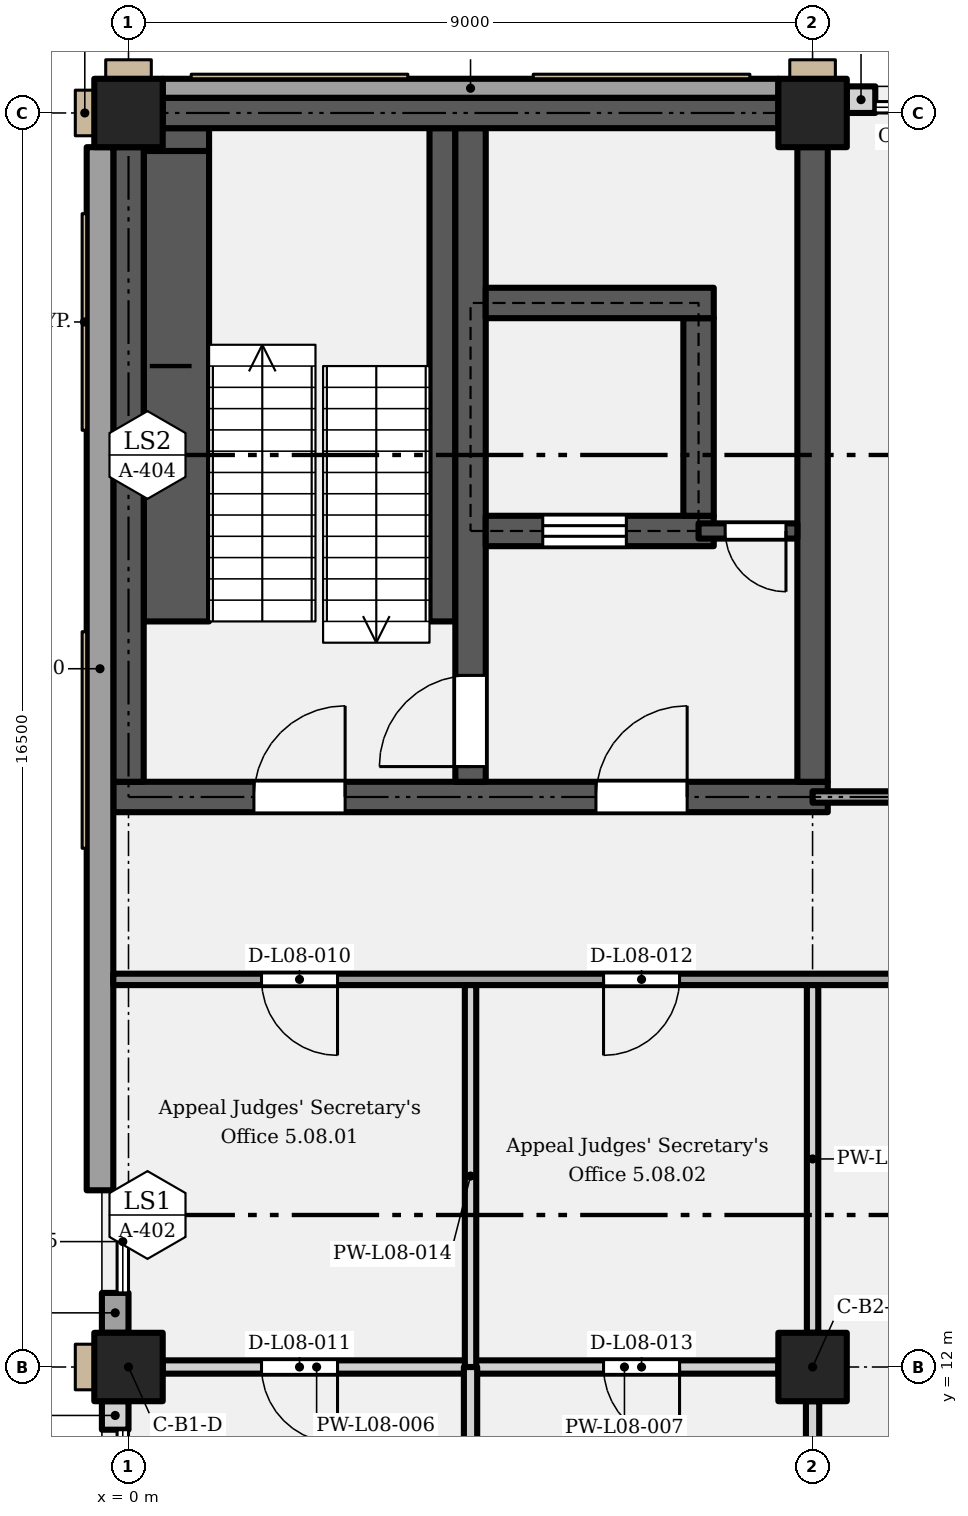
"""IFC4 building model, lengths in metres.
Left out: names, types, materials, properties, quantities, classifications, styles, units other than length and angle.
Written with IfcOpenShell. Run it as: python <this file> out.ifc"""

import sys

from ifc_helpers import new_model, si_unit, direction, frame, frame_2d, origin, origin_2d, place, context, subcontext, project, spatial, rectangle, extrude, element, fill, save


model = new_model("IFC4")
c1 = context("Model", 3, precision=1e-05, world=origin(), true_north=direction((0.0, 1.0)))
c2 = subcontext(c1, "Body", "Model", "MODEL_VIEW")
j1 = project(units=[si_unit("LENGTHUNIT", "METRE"), si_unit("PLANEANGLEUNIT", "RADIAN")], contexts=[c1])
p1 = place(None, origin())
s1 = spatial("IfcSite", under=j1, at=p1, CompositionType="ELEMENT")
p2 = place(p1, origin())
s2 = spatial("IfcBuilding", under=s1, at=p2, CompositionType="ELEMENT")
p3 = place(p2, frame((0.0, 0.0, 44.4)))
s3 = spatial("IfcBuildingStorey", under=s2, at=p3, CompositionType="ELEMENT", Elevation=44.4)
for number, where, z_axis, x_axis in (
    (1, (0.0, 12.0, 0.0), (0.0, 0.0, 1.0), (1.0, 0.0, 0.0)),
    (2, (9.0, 12.0, 0.0), (0.0, 0.0, 1.0), (1.0, 0.0, 0.0)),
    (3, (0.0, 28.5, 0.0), (0.0, 0.0, 1.0), (1.0, 0.0, 0.0)),
    (4, (9.0, 28.5, 0.0), (0.0, 0.0, 1.0), (1.0, 0.0, 0.0)),
):
    element("IfcColumn", number, at=place(p3, frame(where, z_axis=z_axis, x_axis=x_axis)), inside=s3, PredefinedType="COLUMN", context=c2, shape_type="SweptSolid", body=[
        extrude(rectangle(XDim=0.9, YDim=0.9, at=origin_2d()), origin(), (0.0, 0.0, 1.0), 4.5),
    ])
p4 = place(p3, frame((-0.2, 19.5, 0.0), z_axis=(0.0, 0.0, 1.0), x_axis=(1.0, 0.0, 0.0)))
e5 = element("IfcWall", 5, at=p4, inside=s3, PredefinedType="SHEAR", context=c2, shape_type="SweptSolid", body=[
    extrude(rectangle(XDim=9.4, YDim=0.4, at=frame_2d((4.7, 0.0))), origin(), (0.0, 0.0, 1.0), 4.25),
])
p5 = place(p4, frame((1.85, 0.0, 0.0)))
e6 = element("IfcOpeningElement", 6, at=p5, cuts=e5, PredefinedType="OPENING", context=c2, shape_type="SweptSolid", body=[
    extrude(rectangle(XDim=1.2, YDim=2.1, at=frame_2d((0.6, 1.05))), frame((0.0, 0.21, 0.0), z_axis=(0.0, -1.0, 0.0), x_axis=(1.0, 0.0, 0.0)), (0.0, 0.0, 1.0), 0.42),
])
p6 = place(p4, frame((6.35, 0.0, 0.0)))
e7 = element("IfcOpeningElement", 7, at=p6, cuts=e5, PredefinedType="OPENING", context=c2, shape_type="SweptSolid", body=[
    extrude(rectangle(XDim=1.2, YDim=2.1, at=frame_2d((0.6, 1.05))), frame((0.0, 0.21, 0.0), z_axis=(0.0, -1.0, 0.0), x_axis=(1.0, 0.0, 0.0)), (0.0, 0.0, 1.0), 0.42),
])
p7 = place(p3, frame((0.0, 19.7, 0.0), z_axis=(0.0, 0.0, 1.0), x_axis=(0.0, 1.0, 0.0)))
e8 = element("IfcWall", 8, at=p7, inside=s3, PredefinedType="SHEAR", context=c2, shape_type="SweptSolid", body=[
    extrude(rectangle(XDim=8.35, YDim=0.4, at=frame_2d((4.175, 0.0))), origin(), (0.0, 0.0, 1.0), 4.25),
])
p8 = place(p3, frame((4.5, 19.7, 0.0), z_axis=(0.0, 0.0, 1.0), x_axis=(0.0, 1.0, 0.0)))
e9 = element("IfcWall", 9, at=p8, inside=s3, PredefinedType="SHEAR", context=c2, shape_type="SweptSolid", body=[
    extrude(rectangle(XDim=8.6, YDim=0.4, at=frame_2d((4.3, 0.0))), origin(), (0.0, 0.0, 1.0), 4.25),
])
p9 = place(p8, frame((0.2, 0.0, 0.0)))
e10 = element("IfcOpeningElement", 10, at=p9, cuts=e9, PredefinedType="OPENING", context=c2, shape_type="SweptSolid", body=[
    extrude(rectangle(XDim=1.2, YDim=2.1, at=frame_2d((0.6, 1.05))), frame((0.0, 0.21, 0.0), z_axis=(0.0, -1.0, 0.0), x_axis=(1.0, 0.0, 0.0)), (0.0, 0.0, 1.0), 0.42),
])
p10 = place(p3, frame((9.0, 19.7, 0.0), z_axis=(0.0, 0.0, 1.0), x_axis=(0.0, 1.0, 0.0)))
e11 = element("IfcWall", 11, at=p10, inside=s3, PredefinedType="SHEAR", context=c2, shape_type="SweptSolid", body=[
    extrude(rectangle(XDim=8.35, YDim=0.4, at=frame_2d((4.175, 0.0))), origin(), (0.0, 0.0, 1.0), 4.25),
])
p11 = place(p3, frame((4.7, 23.0, 0.0), z_axis=(0.0, 0.0, 1.0), x_axis=(1.0, 0.0, 0.0)))
e12 = element("IfcWall", 12, at=p11, inside=s3, PredefinedType="SHEAR", context=c2, shape_type="SweptSolid", body=[
    extrude(rectangle(XDim=3.0, YDim=0.4, at=frame_2d((1.5, 0.0))), origin(), (0.0, 0.0, 1.0), 4.25),
])
p12 = place(p11, frame((0.75, 0.0, 0.0)))
e13 = element("IfcOpeningElement", 13, at=p12, cuts=e12, PredefinedType="OPENING", context=c2, shape_type="SweptSolid", body=[
    extrude(rectangle(XDim=1.1, YDim=2.1, at=frame_2d((0.55, 1.05))), frame((0.0, 0.21, 0.0), z_axis=(0.0, -1.0, 0.0), x_axis=(1.0, 0.0, 0.0)), (0.0, 0.0, 1.0), 0.42),
])
p13 = place(p3, frame((7.5, 23.2, 0.0), z_axis=(0.0, 0.0, 1.0), x_axis=(0.0, 1.0, 0.0)))
e14 = element("IfcWall", 14, at=p13, inside=s3, PredefinedType="SHEAR", context=c2, shape_type="SweptSolid", body=[
    extrude(rectangle(XDim=2.6, YDim=0.4, at=frame_2d((1.3, 0.0))), origin(), (0.0, 0.0, 1.0), 4.25),
])
p14 = place(p3, frame((4.7, 26.0, 0.0), z_axis=(0.0, 0.0, 1.0), x_axis=(1.0, 0.0, 0.0)))
e15 = element("IfcWall", 15, at=p14, inside=s3, PredefinedType="SHEAR", context=c2, shape_type="SweptSolid", body=[
    extrude(rectangle(XDim=3.0, YDim=0.4, at=frame_2d((1.5, 0.0))), origin(), (0.0, 0.0, 1.0), 4.25),
])
p15 = place(p3, frame((0.45, 28.5, 0.0), z_axis=(0.0, 0.0, 1.0), x_axis=(1.0, 0.0, 0.0)))
e16 = element("IfcWall", 16, at=p15, inside=s3, PredefinedType="SHEAR", context=c2, shape_type="SweptSolid", body=[
    extrude(rectangle(XDim=8.1, YDim=0.4, at=frame_2d((4.05, 0.0))), origin(), (0.0, 0.0, 1.0), 4.25),
])
p16 = place(p3, frame((0.45, 28.825, 0.0), z_axis=(0.0, 0.0, 1.0), x_axis=(1.0, 0.0, 0.0)))
e17 = element("IfcWall", 17, at=p16, inside=s3, PredefinedType="SOLIDWALL", context=c2, shape_type="SweptSolid", body=[
    extrude(rectangle(XDim=8.1, YDim=0.25, at=frame_2d((4.05, 0.0))), origin(), (0.0, 0.0, 1.0), 4.25),
])
for number, where, z_axis, x_axis in (
    (18, (9.45, 28.675, 0.0), (0.0, 0.0, 1.0), (1.0, 0.0, 0.0)),
    (19, (-0.175, 11.175, 0.0), (0.0, 0.0, 1.0), (0.0, 1.0, 0.0)),
):
    element("IfcWall", number, at=place(p3, frame(where, z_axis=z_axis, x_axis=x_axis)), inside=s3, PredefinedType="SOLIDWALL", context=c2, shape_type="SweptSolid", body=[
        extrude(rectangle(XDim=0.375, YDim=0.35, at=frame_2d((0.188, 0.0))), origin(), (0.0, 0.0, 1.0), 4.25),
    ])
p17 = place(p3, frame((-0.175, 12.45, 0.0), z_axis=(0.0, 0.0, 1.0), x_axis=(0.0, 1.0, 0.0)))
e20 = element("IfcWall", 20, at=p17, inside=s3, PredefinedType="SOLIDWALL", context=c2, shape_type="SweptSolid", body=[
    extrude(rectangle(XDim=0.525, YDim=0.35, at=frame_2d((0.263, 0.0))), origin(), (0.0, 0.0, 1.0), 4.25),
])
p18 = place(p3, frame((-0.375, 14.325, 0.0), z_axis=(0.0, 0.0, 1.0), x_axis=(0.0, 1.0, 0.0)))
e21 = element("IfcWall", 21, at=p18, inside=s3, PredefinedType="SOLIDWALL", context=c2, shape_type="SweptSolid", body=[
    extrude(rectangle(XDim=13.725, YDim=0.35, at=frame_2d((6.863, 0.0))), origin(), (0.0, 0.0, 1.0), 4.25),
])
p19 = place(p3, frame((0.45, 12.0, 0.0), z_axis=(0.0, 0.0, 1.0), x_axis=(1.0, 0.0, 0.0)))
e22 = element("IfcWall", 22, at=p19, inside=s3, PredefinedType="PARTITIONING", context=c2, shape_type="SweptSolid", body=[
    extrude(rectangle(XDim=4.05, YDim=0.175, at=frame_2d((2.025, 0.0))), origin(), (0.0, 0.0, 1.0), 3.5),
])
p20 = place(p19, frame((2.3, 0.0, 0.0), z_axis=(0.0, 0.0, 1.0), x_axis=(-1.0, 0.0, 0.0)))
e23 = element("IfcOpeningElement", 23, at=p20, cuts=e22, PredefinedType="OPENING", context=c2, shape_type="SweptSolid", body=[
    extrude(rectangle(XDim=1.0, YDim=2.1, at=frame_2d((0.5, 1.05))), frame((0.0, 0.097, 0.0), z_axis=(0.0, -1.0, 0.0), x_axis=(1.0, 0.0, 0.0)), (0.0, 0.0, 1.0), 0.195),
])
p21 = place(p3, frame((4.5, 12.0, 0.0), z_axis=(0.0, 0.0, 1.0), x_axis=(1.0, 0.0, 0.0)))
e24 = element("IfcWall", 24, at=p21, inside=s3, PredefinedType="PARTITIONING", context=c2, shape_type="SweptSolid", body=[
    extrude(rectangle(XDim=4.05, YDim=0.175, at=frame_2d((2.025, 0.0))), origin(), (0.0, 0.0, 1.0), 3.5),
])
p22 = place(p21, frame((2.75, 0.0, 0.0), z_axis=(0.0, 0.0, 1.0), x_axis=(-1.0, 0.0, 0.0)))
e25 = element("IfcOpeningElement", 25, at=p22, cuts=e24, PredefinedType="OPENING", context=c2, shape_type="SweptSolid", body=[
    extrude(rectangle(XDim=1.0, YDim=2.1, at=frame_2d((0.5, 1.05))), frame((0.0, 0.097, 0.0), z_axis=(0.0, -1.0, 0.0), x_axis=(1.0, 0.0, 0.0)), (0.0, 0.0, 1.0), 0.195),
])
p23 = place(p3, frame((-0.2, 17.1, 0.0), z_axis=(0.0, 0.0, 1.0), x_axis=(1.0, 0.0, 0.0)))
e26 = element("IfcWall", 26, at=p23, inside=s3, PredefinedType="PARTITIONING", context=c2, shape_type="SweptSolid", body=[
    extrude(rectangle(XDim=25.0, YDim=0.15, at=frame_2d((12.5, 0.0))), origin(), (0.0, 0.0, 1.0), 4.25),
])
p24 = place(p23, frame((2.95, 0.0, 0.0), z_axis=(0.0, 0.0, 1.0), x_axis=(-1.0, 0.0, 0.0)))
e27 = element("IfcOpeningElement", 27, at=p24, cuts=e26, PredefinedType="OPENING", context=c2, shape_type="SweptSolid", body=[
    extrude(rectangle(XDim=1.0, YDim=2.1, at=frame_2d((0.5, 1.05))), frame((0.0, 0.085, 0.0), z_axis=(0.0, -1.0, 0.0), x_axis=(1.0, 0.0, 0.0)), (0.0, 0.0, 1.0), 0.17),
])
p25 = place(p23, frame((7.45, 0.0, 0.0), z_axis=(0.0, 0.0, 1.0), x_axis=(-1.0, 0.0, 0.0)))
e28 = element("IfcOpeningElement", 28, at=p25, cuts=e26, PredefinedType="OPENING", context=c2, shape_type="SweptSolid", body=[
    extrude(rectangle(XDim=1.0, YDim=2.1, at=frame_2d((0.5, 1.05))), frame((0.0, 0.085, 0.0), z_axis=(0.0, -1.0, 0.0), x_axis=(1.0, 0.0, 0.0)), (0.0, 0.0, 1.0), 0.17),
])
p26 = place(p23, frame((14.2, 0.0, 0.0), z_axis=(0.0, 0.0, 1.0), x_axis=(-1.0, 0.0, 0.0)))
e29 = element("IfcOpeningElement", 29, at=p26, cuts=e26, PredefinedType="OPENING", context=c2, shape_type="SweptSolid", body=[
    extrude(rectangle(XDim=1.0, YDim=2.1, at=frame_2d((0.5, 1.05))), frame((0.0, 0.085, 0.0), z_axis=(0.0, -1.0, 0.0), x_axis=(1.0, 0.0, 0.0)), (0.0, 0.0, 1.0), 0.17),
])
p27 = place(p23, frame((20.95, 0.0, 0.0), z_axis=(0.0, 0.0, 1.0), x_axis=(-1.0, 0.0, 0.0)))
e30 = element("IfcOpeningElement", 30, at=p27, cuts=e26, PredefinedType="OPENING", context=c2, shape_type="SweptSolid", body=[
    extrude(rectangle(XDim=1.0, YDim=2.1, at=frame_2d((0.5, 1.05))), frame((0.0, 0.085, 0.0), z_axis=(0.0, -1.0, 0.0), x_axis=(1.0, 0.0, 0.0)), (0.0, 0.0, 1.0), 0.17),
])
p28 = place(p3, frame((9.0, 19.5, 0.0), z_axis=(0.0, 0.0, 1.0), x_axis=(1.0, 0.0, 0.0)))
e31 = element("IfcWall", 31, at=p28, inside=s3, PredefinedType="PARTITIONING", context=c2, shape_type="SweptSolid", body=[
    extrude(rectangle(XDim=9.0, YDim=0.15, at=frame_2d((4.5, 0.0))), origin(), (0.0, 0.0, 1.0), 4.25),
])
p29 = place(p28, frame((3.6, 0.0, 0.0)))
e32 = element("IfcOpeningElement", 32, at=p29, cuts=e31, PredefinedType="OPENING", context=c2, shape_type="SweptSolid", body=[
    extrude(rectangle(XDim=1.8, YDim=2.1, at=frame_2d((0.9, 1.05))), frame((0.0, 0.085, 0.0), z_axis=(0.0, -1.0, 0.0), x_axis=(1.0, 0.0, 0.0)), (0.0, 0.0, 1.0), 0.17),
])
p30 = place(p3, frame((7.5, 23.0, 0.0), z_axis=(0.0, 0.0, 1.0), x_axis=(1.0, 0.0, 0.0)))
e33 = element("IfcWall", 33, at=p30, inside=s3, PredefinedType="SHEAR", context=c2, shape_type="SweptSolid", body=[
    extrude(rectangle(XDim=1.3, YDim=0.2, at=frame_2d((0.65, 0.0))), origin(), (0.0, 0.0, 1.0), 4.25),
])
p31 = place(p30, frame((1.15, 0.0, 0.0), z_axis=(0.0, 0.0, 1.0), x_axis=(-1.0, 0.0, 0.0)))
e34 = element("IfcOpeningElement", 34, at=p31, cuts=e33, PredefinedType="OPENING", context=c2, shape_type="SweptSolid", body=[
    extrude(rectangle(XDim=0.8, YDim=2.0, at=frame_2d((0.4, 1.0))), frame((0.0, 0.11, 0.0), z_axis=(0.0, -1.0, 0.0), x_axis=(1.0, 0.0, 0.0)), (0.0, 0.0, 1.0), 0.22),
])
p32 = place(p3, frame((4.5, 0.0, 0.0), z_axis=(0.0, 0.0, 1.0), x_axis=(0.0, 1.0, 0.0)))
e35 = element("IfcWall", 35, at=p32, inside=s3, PredefinedType="PARTITIONING", context=c2, shape_type="SweptSolid", body=[
    extrude(rectangle(XDim=12.0, YDim=0.175, at=frame_2d((6.0, 0.0))), origin(), (0.0, 0.0, 1.0), 4.25),
])
p33 = place(p3, frame((4.5, 12.0, 0.0), z_axis=(0.0, 0.0, 1.0), x_axis=(0.0, 1.0, 0.0)))
e36 = element("IfcWall", 36, at=p33, inside=s3, PredefinedType="PARTITIONING", context=c2, shape_type="SweptSolid", body=[
    extrude(rectangle(XDim=5.025, YDim=0.15, at=frame_2d((2.512, 0.0))), origin(), (0.0, 0.0, 1.0), 4.25),
])
p34 = place(p3, frame((9.0, 0.45, 0.0), z_axis=(0.0, 0.0, 1.0), x_axis=(0.0, 1.0, 0.0)))
e37 = element("IfcWall", 37, at=p34, inside=s3, PredefinedType="PARTITIONING", context=c2, shape_type="SweptSolid", body=[
    extrude(rectangle(XDim=11.1, YDim=0.175, at=frame_2d((5.55, 0.0))), origin(), (0.0, 0.0, 1.0), 3.5),
])
p35 = place(p3, frame((9.0, 12.45, 0.0), z_axis=(0.0, 0.0, 1.0), x_axis=(0.0, 1.0, 0.0)))
e38 = element("IfcWall", 38, at=p35, inside=s3, PredefinedType="PARTITIONING", context=c2, shape_type="SweptSolid", body=[
    extrude(rectangle(XDim=4.575, YDim=0.15, at=frame_2d((2.288, 0.0))), origin(), (0.0, 0.0, 1.0), 3.3),
])
p36 = place(p3, frame((0.63, 21.81, 0.0), z_axis=(0.0, 0.0, 1.0), x_axis=(0.0, 1.0, 0.0)))
e39 = element("IfcWall", 39, at=p36, inside=s3, PredefinedType="SHEAR", context=c2, shape_type="SweptSolid", body=[
    extrude(rectangle(XDim=6.19, YDim=0.86, at=frame_2d((3.095, 0.0))), origin(), (0.0, 0.0, 1.0), 2.05),
])
p37 = place(p3, frame((0.68, 28.0, 0.0), z_axis=(0.0, 0.0, 1.0), x_axis=(0.0, 1.0, 0.0)))
e40 = element("IfcWall", 40, at=p37, inside=s3, PredefinedType="SHEAR", context=c2, shape_type="SweptSolid", body=[
    extrude(rectangle(XDim=0.3, YDim=0.76, at=frame_2d((0.15, 0.0))), origin(), (0.0, 0.0, 1.0), 2.05),
])
p38 = place(p3, frame((4.13, 21.81, 0.0), z_axis=(0.0, 0.0, 1.0), x_axis=(0.0, 1.0, 0.0)))
e41 = element("IfcWall", 41, at=p38, inside=s3, PredefinedType="SHEAR", context=c2, shape_type="SweptSolid", body=[
    extrude(rectangle(XDim=6.49, YDim=0.34, at=frame_2d((3.245, 0.0))), origin(), (0.0, 0.0, 1.0), 2.05),
])
p39 = place(p5, origin())
e42 = element("IfcDoor", 42, at=p39, inside=s3, OperationType="SINGLE_SWING_RIGHT", PredefinedType="DOOR", context=c2, shape_type="SweptSolid", body=[
    extrude(rectangle(XDim=1.2, YDim=2.1, at=frame_2d((0.6, 1.05))), frame((0.0, 0.025, 0.0), z_axis=(0.0, -1.0, 0.0), x_axis=(1.0, 0.0, 0.0)), (0.0, 0.0, 1.0), 0.05),
])
fill(e6, e42)
p40 = place(p9, origin())
e43 = element("IfcDoor", 43, at=p40, inside=s3, OperationType="SINGLE_SWING_LEFT", PredefinedType="DOOR", context=c2, shape_type="SweptSolid", body=[
    extrude(rectangle(XDim=1.2, YDim=2.1, at=frame_2d((0.6, 1.05))), frame((0.0, 0.025, 0.0), z_axis=(0.0, -1.0, 0.0), x_axis=(1.0, 0.0, 0.0)), (0.0, 0.0, 1.0), 0.05),
])
fill(e10, e43)
p41 = place(p6, origin())
e44 = element("IfcDoor", 44, at=p41, inside=s3, OperationType="SINGLE_SWING_RIGHT", PredefinedType="DOOR", context=c2, shape_type="SweptSolid", body=[
    extrude(rectangle(XDim=1.2, YDim=2.1, at=frame_2d((0.6, 1.05))), frame((0.0, 0.025, 0.0), z_axis=(0.0, -1.0, 0.0), x_axis=(1.0, 0.0, 0.0)), (0.0, 0.0, 1.0), 0.05),
])
fill(e7, e44)
p42 = place(p12, origin())
e45 = element("IfcDoor", 45, at=p42, inside=s3, OperationType="SLIDING_TO_LEFT", PredefinedType="DOOR", context=c2, shape_type="SweptSolid", body=[
    extrude(rectangle(XDim=1.1, YDim=2.1, at=frame_2d((0.55, 1.05))), frame((0.0, 0.025, 0.0), z_axis=(0.0, -1.0, 0.0), x_axis=(1.0, 0.0, 0.0)), (0.0, 0.0, 1.0), 0.05),
])
fill(e13, e45)
p43 = place(p31, origin())
e46 = element("IfcDoor", 46, at=p43, inside=s3, OperationType="SINGLE_SWING_LEFT", PredefinedType="DOOR", context=c2, shape_type="SweptSolid", body=[
    extrude(rectangle(XDim=0.8, YDim=2.0, at=frame_2d((0.4, 1.0))), frame((0.0, 0.025, 0.0), z_axis=(0.0, -1.0, 0.0), x_axis=(1.0, 0.0, 0.0)), (0.0, 0.0, 1.0), 0.05),
])
fill(e34, e46)
p44 = place(p24, origin())
e47 = element("IfcDoor", 47, at=p44, inside=s3, OperationType="SINGLE_SWING_LEFT", PredefinedType="DOOR", context=c2, shape_type="SweptSolid", body=[
    extrude(rectangle(XDim=1.0, YDim=2.1, at=frame_2d((0.5, 1.05))), frame((0.0, 0.025, 0.0), z_axis=(0.0, -1.0, 0.0), x_axis=(1.0, 0.0, 0.0)), (0.0, 0.0, 1.0), 0.05),
])
fill(e27, e47)
p45 = place(p20, origin())
e48 = element("IfcDoor", 48, at=p45, inside=s3, OperationType="SINGLE_SWING_LEFT", PredefinedType="DOOR", context=c2, shape_type="SweptSolid", body=[
    extrude(rectangle(XDim=1.0, YDim=2.1, at=frame_2d((0.5, 1.05))), frame((0.0, 0.025, 0.0), z_axis=(0.0, -1.0, 0.0), x_axis=(1.0, 0.0, 0.0)), (0.0, 0.0, 1.0), 0.05),
])
fill(e23, e48)
p46 = place(p25, origin())
e49 = element("IfcDoor", 49, at=p46, inside=s3, OperationType="SINGLE_SWING_RIGHT", PredefinedType="DOOR", context=c2, shape_type="SweptSolid", body=[
    extrude(rectangle(XDim=1.0, YDim=2.1, at=frame_2d((0.5, 1.05))), frame((0.0, 0.025, 0.0), z_axis=(0.0, -1.0, 0.0), x_axis=(1.0, 0.0, 0.0)), (0.0, 0.0, 1.0), 0.05),
])
fill(e28, e49)
p47 = place(p22, origin())
e50 = element("IfcDoor", 50, at=p47, inside=s3, OperationType="SINGLE_SWING_LEFT", PredefinedType="DOOR", context=c2, shape_type="SweptSolid", body=[
    extrude(rectangle(XDim=1.0, YDim=2.1, at=frame_2d((0.5, 1.05))), frame((0.0, 0.025, 0.0), z_axis=(0.0, -1.0, 0.0), x_axis=(1.0, 0.0, 0.0)), (0.0, 0.0, 1.0), 0.05),
])
fill(e25, e50)
save(model, sys.argv[1])
